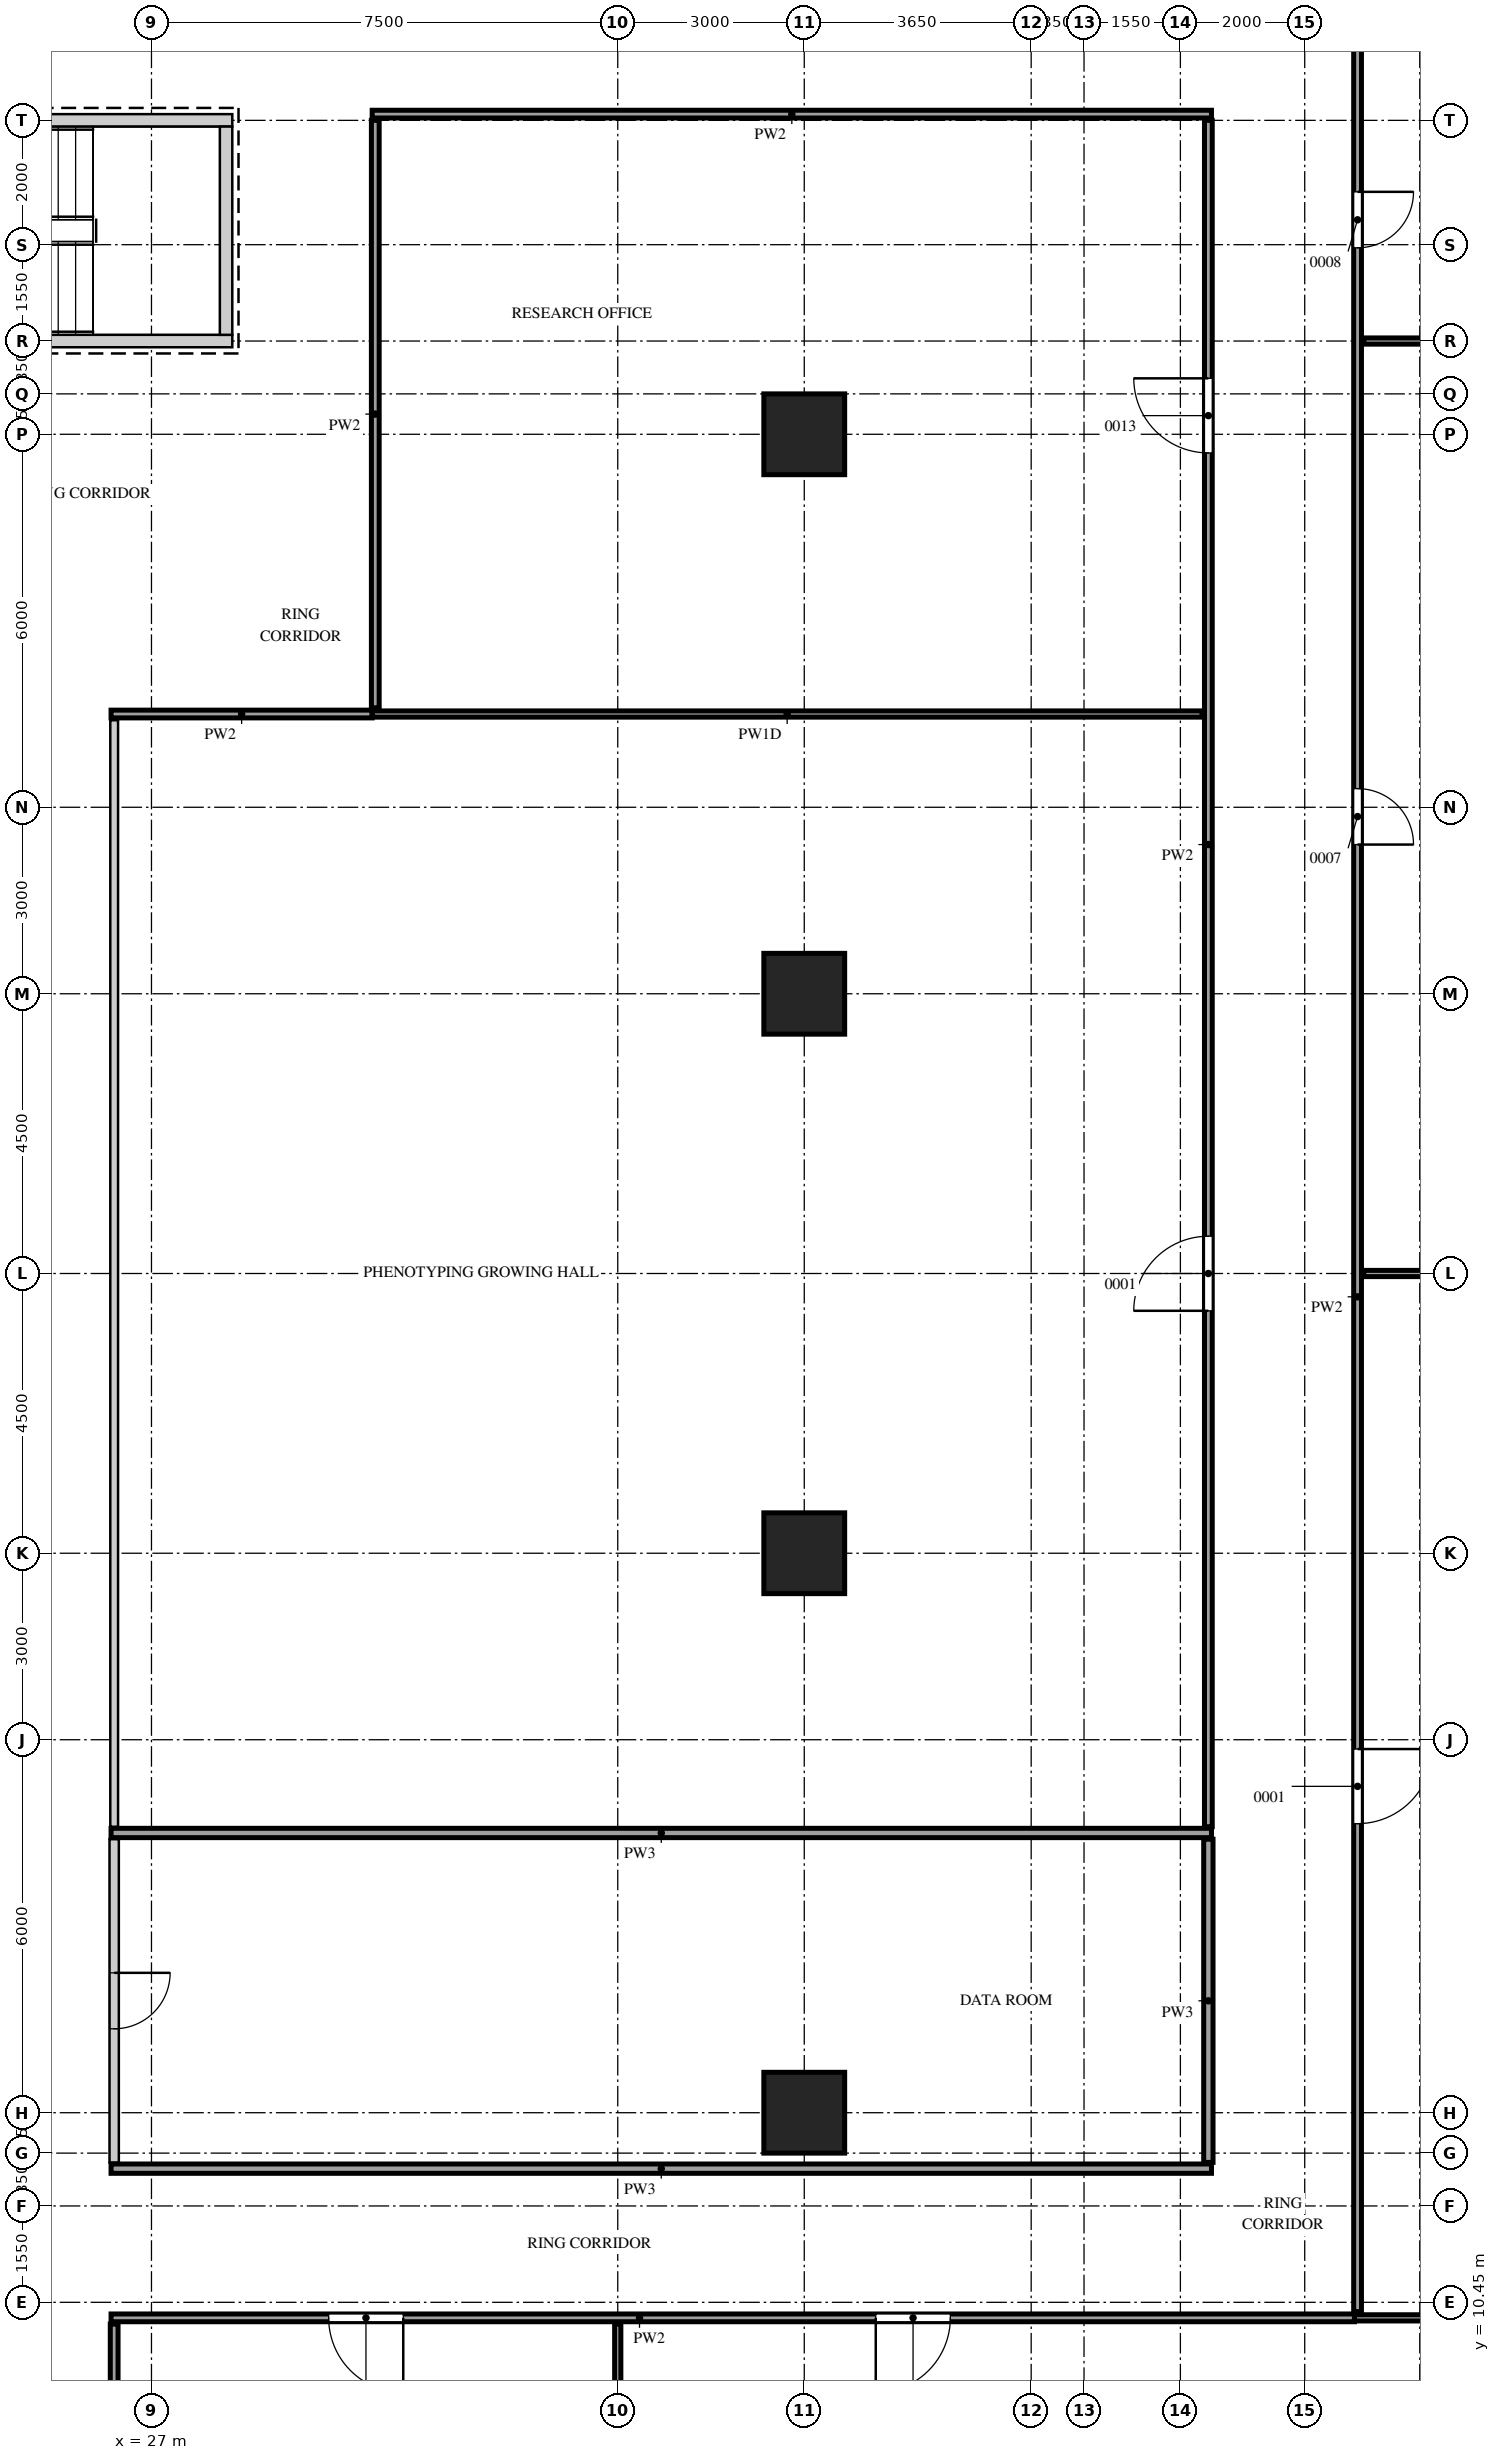
"""IFC4 building model, lengths in metres.
Left out: names, types, materials, properties, quantities, classifications, styles, units other than length and angle.
Written with IfcOpenShell. Run it as: python <this file> out.ifc"""

import sys

from ifc_helpers import new_model, si_unit, direction, frame, frame_2d, origin, origin_2d, place, context, subcontext, project, spatial, rectangle, extrude, source, transform, mapped, element, fill, save


model = new_model("IFC4")
c1 = context("Model", 3, precision=1e-05, world=origin(), true_north=direction((0.0, 1.0)))
c2 = subcontext(c1, "Body", "Model", "MODEL_VIEW")
j1 = project(units=[si_unit("LENGTHUNIT", "METRE"), si_unit("PLANEANGLEUNIT", "RADIAN")], contexts=[c1])
p1 = place(None, origin())
s1 = spatial("IfcSite", under=j1, at=p1, CompositionType="ELEMENT")
p2 = place(p1, origin())
s2 = spatial("IfcBuilding", under=s1, at=p2, CompositionType="ELEMENT")
p3 = place(p2, frame((0.0, 0.0, 127.9)))
s3 = spatial("IfcBuildingStorey", under=s2, at=p3, CompositionType="ELEMENT", Elevation=127.9)
m1 = source(origin(), c2, "Body", "SweptSolid", [
    extrude(rectangle(XDim=7.1, YDim=0.2, at=frame_2d((3.55, 0.0))), origin(), (0.0, 0.0, 1.0), 4.1),
])
p4 = place(p3, frame((21.2, 45.55, 0.0), z_axis=(0.0, 0.0, 1.0), x_axis=(1.0, 0.0, 0.0)))
e1 = element("IfcWall", 1, at=p4, inside=s3, PredefinedType="SHEAR", context=c2, shape_type="MappedRepresentation", body=[
    mapped(m1, transform((0.0, 0.0, 0.0))),
])
m2 = source(origin(), c2, "Body", "SweptSolid", [
    extrude(rectangle(XDim=1.2, YDim=2.1, at=frame_2d((0.6, 1.05))), frame((0.0, 0.11, 0.0), z_axis=(0.0, -1.0, 0.0), x_axis=(1.0, 0.0, 0.0)), (0.0, 0.0, 1.0), 0.22),
])
p5 = place(p4, frame((0.15, 0.0, 0.0)))
e2 = element("IfcOpeningElement", 2, at=p5, cuts=e1, PredefinedType="OPENING", context=c2, shape_type="MappedRepresentation", body=[
    mapped(m2, transform((0.0, 0.0, 0.0))),
])
p6 = place(p3, frame((21.2, 42.0, 0.0), z_axis=(0.0, 0.0, 1.0), x_axis=(1.0, 0.0, 0.0)))
e3 = element("IfcWall", 3, at=p6, inside=s3, PredefinedType="SHEAR", context=c2, shape_type="MappedRepresentation", body=[
    mapped(m1, transform((0.0, 0.0, 0.0))),
])
m3 = source(origin(), c2, "Body", "SweptSolid", [
    extrude(rectangle(XDim=3.35, YDim=0.2, at=frame_2d((1.675, 0.0))), origin(), (0.0, 0.0, 1.0), 4.1),
])
p7 = place(p3, frame((28.2, 42.1, 0.0), z_axis=(0.0, 0.0, 1.0), x_axis=(0.0, 1.0, 0.0)))
e4 = element("IfcWall", 4, at=p7, inside=s3, PredefinedType="SHEAR", context=c2, shape_type="MappedRepresentation", body=[
    mapped(m3, transform((0.0, 0.0, 0.0))),
])
m4 = source(origin(), c2, "Body", "SweptSolid", [
    extrude(rectangle(XDim=1.3, YDim=1.3, at=origin_2d()), origin(), (0.0, 0.0, 1.0), 4.1),
])
for number, where, z_axis, x_axis in (
    (5, (37.5, 13.5, 0.0), (0.0, 0.0, 1.0), (1.0, 0.0, 0.0)),
    (6, (37.5, 22.5, 0.0), (0.0, 0.0, 1.0), (1.0, 0.0, 0.0)),
    (7, (37.5, 31.5, 0.0), (0.0, 0.0, 1.0), (1.0, 0.0, 0.0)),
    (8, (37.5, 40.5, 0.0), (0.0, 0.0, 1.0), (1.0, 0.0, 0.0)),
):
    element("IfcColumn", number, at=place(p3, frame(where, z_axis=z_axis, x_axis=x_axis)), inside=s3, PredefinedType="COLUMN", context=c2, shape_type="MappedRepresentation", body=[
        mapped(m4, transform((0.0, 0.0, 0.0))),
    ])
m5 = source(origin(), c2, "Body", "SweptSolid", [
    extrude(rectangle(XDim=8.45, YDim=0.1, at=frame_2d((4.225, 0.0))), origin(), (0.0, 0.0, 1.0), 3.6),
])
p8 = place(p3, frame((34.5, 1.65, 0.0), z_axis=(0.0, 0.0, 1.0), x_axis=(0.0, 1.0, 0.0)))
e9 = element("IfcWall", 9, at=p8, inside=s3, PredefinedType="PARTITIONING", context=c2, shape_type="MappedRepresentation", body=[
    mapped(m5, transform((0.0, 0.0, 0.0))),
])
m6 = source(origin(), c2, "Body", "SweptSolid", [
    extrude(rectangle(XDim=3.95, YDim=0.125, at=frame_2d((1.975, 0.0))), origin(), (0.0, 0.0, 1.0), 4.2),
])
p9 = place(p3, frame((26.4, 6.15, 0.0), z_axis=(0.0, 0.0, 1.0), x_axis=(0.0, 1.0, 0.0)))
e10 = element("IfcWall", 10, at=p9, inside=s3, PredefinedType="PARTITIONING", context=c2, shape_type="MappedRepresentation", body=[
    mapped(m6, transform((0.0, 0.0, 0.0))),
])
m7 = source(origin(), c2, "Body", "SweptSolid", [
    extrude(rectangle(XDim=20.0, YDim=0.125, at=frame_2d((10.0, 0.0))), origin(), (0.0, 0.0, 1.0), 4.2),
])
p10 = place(p3, frame((26.35, 10.2, 0.0), z_axis=(0.0, 0.0, 1.0), x_axis=(1.0, 0.0, 0.0)))
e11 = element("IfcWall", 11, at=p10, inside=s3, PredefinedType="PARTITIONING", context=c2, shape_type="MappedRepresentation", body=[
    mapped(m7, transform((0.0, 0.0, 0.0))),
])
m8 = source(origin(), c2, "Body", "SweptSolid", [
    extrude(rectangle(XDim=1.2, YDim=2.1, at=frame_2d((0.6, 1.05))), frame((0.0, 0.073, 0.0), z_axis=(0.0, -1.0, 0.0), x_axis=(1.0, 0.0, 0.0)), (0.0, 0.0, 1.0), 0.145),
])
p11 = place(p10, frame((3.5, 0.0, 0.0)))
e12 = element("IfcOpeningElement", 12, at=p11, cuts=e11, PredefinedType="OPENING", context=c2, shape_type="MappedRepresentation", body=[
    mapped(m8, transform((0.0, 0.0, 0.0))),
])
p12 = place(p10, frame((12.3, 0.0, 0.0)))
e13 = element("IfcOpeningElement", 13, at=p12, cuts=e11, PredefinedType="OPENING", context=c2, shape_type="MappedRepresentation", body=[
    mapped(m8, transform((0.0, 0.0, 0.0))),
])
m9 = source(origin(), c2, "Body", "SweptSolid", [
    extrude(rectangle(XDim=6.0, YDim=0.1, at=frame_2d((3.0, 0.0))), origin(), (0.0, 0.0, 1.0), 4.2),
])
p13 = place(p3, frame((46.35, 10.2, 0.0), z_axis=(0.0, 0.0, 1.0), x_axis=(1.0, 0.0, 0.0)))
e14 = element("IfcWall", 14, at=p13, inside=s3, PredefinedType="PARTITIONING", context=c2, shape_type="MappedRepresentation", body=[
    mapped(m9, transform((0.0, 0.0, 0.0))),
])
m10 = source(origin(), c2, "Body", "SweptSolid", [
    extrude(rectangle(XDim=37.65, YDim=0.125, at=frame_2d((18.825, 0.0))), origin(), (0.0, 0.0, 1.0), 4.2),
])
p14 = place(p3, frame((46.4, 10.3, 0.0), z_axis=(0.0, 0.0, 1.0), x_axis=(0.0, 1.0, 0.0)))
e15 = element("IfcWall", 15, at=p14, inside=s3, PredefinedType="PARTITIONING", context=c2, shape_type="MappedRepresentation", body=[
    mapped(m10, transform((0.0, 0.0, 0.0))),
])
p15 = place(p14, frame((7.85, 0.0, 0.0)))
e16 = element("IfcOpeningElement", 16, at=p15, cuts=e15, PredefinedType="OPENING", context=c2, shape_type="MappedRepresentation", body=[
    mapped(m8, transform((0.0, 0.0, 0.0))),
])
m11 = source(origin(), c2, "Body", "SweptSolid", [
    extrude(rectangle(XDim=0.9, YDim=2.1, at=frame_2d((0.45, 1.05))), frame((0.0, 0.073, 0.0), z_axis=(0.0, -1.0, 0.0), x_axis=(1.0, 0.0, 0.0)), (0.0, 0.0, 1.0), 0.145),
])
p16 = place(p14, frame((23.6, 0.0, 0.0)))
e17 = element("IfcOpeningElement", 17, at=p16, cuts=e15, PredefinedType="OPENING", context=c2, shape_type="MappedRepresentation", body=[
    mapped(m11, transform((0.0, 0.0, 0.0))),
])
p17 = place(p14, frame((33.2, 0.0, 0.0)))
e18 = element("IfcOpeningElement", 18, at=p17, cuts=e15, PredefinedType="OPENING", context=c2, shape_type="MappedRepresentation", body=[
    mapped(m11, transform((0.0, 0.0, 0.0))),
])
m12 = source(origin(), c2, "Body", "SweptSolid", [
    extrude(rectangle(XDim=17.7, YDim=0.15, at=frame_2d((8.85, 0.0))), origin(), (0.0, 0.0, 1.0), 4.2),
])
p18 = place(p3, frame((26.35, 12.6, 0.0), z_axis=(0.0, 0.0, 1.0), x_axis=(1.0, 0.0, 0.0)))
e19 = element("IfcWall", 19, at=p18, inside=s3, PredefinedType="PARTITIONING", context=c2, shape_type="MappedRepresentation", body=[
    mapped(m12, transform((0.0, 0.0, 0.0))),
])
m13 = source(origin(), c2, "Body", "SweptSolid", [
    extrude(rectangle(XDim=5.2, YDim=0.15, at=frame_2d((2.6, 0.0))), origin(), (0.0, 0.0, 1.0), 4.2),
])
p19 = place(p3, frame((26.4, 12.7, 0.0), z_axis=(0.0, 0.0, 1.0), x_axis=(0.0, 1.0, 0.0)))
e20 = element("IfcWall", 20, at=p19, inside=s3, PredefinedType="PARTITIONING", context=c2, shape_type="MappedRepresentation", body=[
    mapped(m13, transform((0.0, 0.0, 0.0))),
])
m14 = source(origin(), c2, "Body", "SweptSolid", [
    extrude(rectangle(XDim=0.9, YDim=2.1, at=frame_2d((0.45, 1.05))), frame((0.0, 0.085, 0.0), z_axis=(0.0, -1.0, 0.0), x_axis=(1.0, 0.0, 0.0)), (0.0, 0.0, 1.0), 0.17),
])
p20 = place(p19, frame((2.15, 0.0, 0.0)))
e21 = element("IfcOpeningElement", 21, at=p20, cuts=e20, PredefinedType="OPENING", context=c2, shape_type="MappedRepresentation", body=[
    mapped(m14, transform((0.0, 0.0, 0.0))),
])
p21 = place(p3, frame((44.0, 12.7, 0.0), z_axis=(0.0, 0.0, 1.0), x_axis=(0.0, 1.0, 0.0)))
e22 = element("IfcWall", 22, at=p21, inside=s3, PredefinedType="PARTITIONING", context=c2, shape_type="MappedRepresentation", body=[
    mapped(m13, transform((0.0, 0.0, 0.0))),
])
p22 = place(p3, frame((26.35, 18.0, 0.0), z_axis=(0.0, 0.0, 1.0), x_axis=(1.0, 0.0, 0.0)))
e23 = element("IfcWall", 23, at=p22, inside=s3, PredefinedType="PARTITIONING", context=c2, shape_type="MappedRepresentation", body=[
    mapped(m12, transform((0.0, 0.0, 0.0))),
])
m15 = source(origin(), c2, "Body", "SweptSolid", [
    extrude(rectangle(XDim=17.8, YDim=0.125, at=frame_2d((8.9, 0.0))), origin(), (0.0, 0.0, 1.0), 4.2),
])
p23 = place(p3, frame((26.4, 18.1, 0.0), z_axis=(0.0, 0.0, 1.0), x_axis=(0.0, 1.0, 0.0)))
e24 = element("IfcWall", 24, at=p23, inside=s3, PredefinedType="PARTITIONING", context=c2, shape_type="MappedRepresentation", body=[
    mapped(m15, transform((0.0, 0.0, 0.0))),
])
m16 = source(origin(), c2, "Body", "SweptSolid", [
    extrude(rectangle(XDim=27.45, YDim=0.125, at=frame_2d((13.725, 0.0))), origin(), (0.0, 0.0, 1.0), 4.2),
])
p24 = place(p3, frame((44.0, 18.1, 0.0), z_axis=(0.0, 0.0, 1.0), x_axis=(0.0, 1.0, 0.0)))
e25 = element("IfcWall", 25, at=p24, inside=s3, PredefinedType="PARTITIONING", context=c2, shape_type="MappedRepresentation", body=[
    mapped(m16, transform((0.0, 0.0, 0.0))),
])
p25 = place(p24, frame((8.3, 0.0, 0.0)))
e26 = element("IfcOpeningElement", 26, at=p25, cuts=e25, PredefinedType="OPENING", context=c2, shape_type="MappedRepresentation", body=[
    mapped(m8, transform((0.0, 0.0, 0.0))),
])
p26 = place(p24, frame((22.1, 0.0, 0.0)))
e27 = element("IfcOpeningElement", 27, at=p26, cuts=e25, PredefinedType="OPENING", context=c2, shape_type="MappedRepresentation", body=[
    mapped(m8, transform((0.0, 0.0, 0.0))),
])
m17 = source(origin(), c2, "Body", "SweptSolid", [
    extrude(rectangle(XDim=5.85, YDim=0.1, at=frame_2d((2.925, 0.0))), origin(), (0.0, 0.0, 1.0), 4.2),
])
p27 = place(p3, frame((46.5, 27.0, 0.0), z_axis=(0.0, 0.0, 1.0), x_axis=(1.0, 0.0, 0.0)))
e28 = element("IfcWall", 28, at=p27, inside=s3, PredefinedType="PARTITIONING", context=c2, shape_type="MappedRepresentation", body=[
    mapped(m17, transform((0.0, 0.0, 0.0))),
])
m18 = source(origin(), c2, "Body", "SweptSolid", [
    extrude(rectangle(XDim=4.2, YDim=0.125, at=frame_2d((2.1, 0.0))), origin(), (0.0, 0.0, 1.0), 4.2),
])
p28 = place(p3, frame((26.35, 36.0, 0.0), z_axis=(0.0, 0.0, 1.0), x_axis=(1.0, 0.0, 0.0)))
e29 = element("IfcWall", 29, at=p28, inside=s3, PredefinedType="PARTITIONING", context=c2, shape_type="MappedRepresentation", body=[
    mapped(m18, transform((0.0, 0.0, 0.0))),
])
m19 = source(origin(), c2, "Body", "SweptSolid", [
    extrude(rectangle(XDim=13.35, YDim=0.1, at=frame_2d((6.675, 0.0))), origin(), (0.0, 0.0, 1.0), 4.2),
])
p29 = place(p3, frame((30.55, 36.0, 0.0), z_axis=(0.0, 0.0, 1.0), x_axis=(1.0, 0.0, 0.0)))
e30 = element("IfcWall", 30, at=p29, inside=s3, PredefinedType="PARTITIONING", context=c2, shape_type="MappedRepresentation", body=[
    mapped(m19, transform((0.0, 0.0, 0.0))),
])
m20 = source(origin(), c2, "Body", "SweptSolid", [
    extrude(rectangle(XDim=9.45, YDim=0.125, at=frame_2d((4.725, 0.0))), origin(), (0.0, 0.0, 1.0), 4.2),
])
p30 = place(p3, frame((30.6, 36.1, 0.0), z_axis=(0.0, 0.0, 1.0), x_axis=(0.0, 1.0, 0.0)))
e31 = element("IfcWall", 31, at=p30, inside=s3, PredefinedType="PARTITIONING", context=c2, shape_type="MappedRepresentation", body=[
    mapped(m20, transform((0.0, 0.0, 0.0))),
])
p31 = place(p3, frame((46.5, 42.0, 0.0), z_axis=(0.0, 0.0, 1.0), x_axis=(1.0, 0.0, 0.0)))
e32 = element("IfcWall", 32, at=p31, inside=s3, PredefinedType="PARTITIONING", context=c2, shape_type="MappedRepresentation", body=[
    mapped(m17, transform((0.0, 0.0, 0.0))),
])
m21 = source(origin(), c2, "Body", "SweptSolid", [
    extrude(rectangle(XDim=13.5, YDim=0.125, at=frame_2d((6.75, 0.0))), origin(), (0.0, 0.0, 1.0), 4.2),
])
p32 = place(p3, frame((30.55, 45.65, 0.0), z_axis=(0.0, 0.0, 1.0), x_axis=(1.0, 0.0, 0.0)))
e33 = element("IfcWall", 33, at=p32, inside=s3, PredefinedType="PARTITIONING", context=c2, shape_type="MappedRepresentation", body=[
    mapped(m21, transform((0.0, 0.0, 0.0))),
])
m22 = source(origin(), c2, "Body", "SweptSolid", [
    extrude(rectangle(XDim=1.2, YDim=2.1, at=frame_2d((0.6, 1.05))), frame((0.0, 0.025, 0.0), z_axis=(0.0, -1.0, 0.0), x_axis=(1.0, 0.0, 0.0)), (0.0, 0.0, 1.0), 0.05),
])
p33 = place(p11, origin())
e34 = element("IfcDoor", 34, at=p33, inside=s3, OperationType="SINGLE_SWING_RIGHT", PredefinedType="DOOR", context=c2, shape_type="MappedRepresentation", body=[
    mapped(m22, transform((0.0, 0.0, 0.0))),
])
fill(e12, e34)
p34 = place(p12, origin())
e35 = element("IfcDoor", 35, at=p34, inside=s3, OperationType="SINGLE_SWING_LEFT", PredefinedType="DOOR", context=c2, shape_type="MappedRepresentation", body=[
    mapped(m22, transform((0.0, 0.0, 0.0))),
])
fill(e13, e35)
m23 = source(origin(), c2, "Body", "SweptSolid", [
    extrude(rectangle(XDim=0.9, YDim=2.1, at=frame_2d((0.45, 1.05))), frame((0.0, 0.025, 0.0), z_axis=(0.0, -1.0, 0.0), x_axis=(1.0, 0.0, 0.0)), (0.0, 0.0, 1.0), 0.05),
])
p35 = place(p20, origin())
e36 = element("IfcDoor", 36, at=p35, inside=s3, OperationType="SINGLE_SWING_RIGHT", PredefinedType="DOOR", context=c2, shape_type="MappedRepresentation", body=[
    mapped(m23, transform((0.0, 0.0, 0.0))),
])
fill(e21, e36)
p36 = place(p25, origin())
e37 = element("IfcDoor", 37, at=p36, inside=s3, OperationType="SINGLE_SWING_RIGHT", PredefinedType="DOOR", context=c2, shape_type="MappedRepresentation", body=[
    mapped(m22, transform((0.0, 0.0, 0.0))),
])
fill(e26, e37)
p37 = place(p26, origin())
e38 = element("IfcDoor", 38, at=p37, inside=s3, OperationType="SINGLE_SWING_LEFT", PredefinedType="DOOR", context=c2, shape_type="MappedRepresentation", body=[
    mapped(m22, transform((0.0, 0.0, 0.0))),
])
fill(e27, e38)
p38 = place(p15, origin())
e39 = element("IfcDoor", 39, at=p38, inside=s3, OperationType="SINGLE_SWING_RIGHT", PredefinedType="DOOR", context=c2, shape_type="MappedRepresentation", body=[
    mapped(m22, transform((0.0, 0.0, 0.0))),
])
fill(e16, e39)
p39 = place(p16, origin())
e40 = element("IfcDoor", 40, at=p39, inside=s3, OperationType="SINGLE_SWING_LEFT", PredefinedType="DOOR", context=c2, shape_type="MappedRepresentation", body=[
    mapped(m23, transform((0.0, 0.0, 0.0))),
])
fill(e17, e40)
p40 = place(p17, origin())
e41 = element("IfcDoor", 41, at=p40, inside=s3, OperationType="SINGLE_SWING_RIGHT", PredefinedType="DOOR", context=c2, shape_type="MappedRepresentation", body=[
    mapped(m23, transform((0.0, 0.0, 0.0))),
])
fill(e18, e41)
save(model, sys.argv[1])
